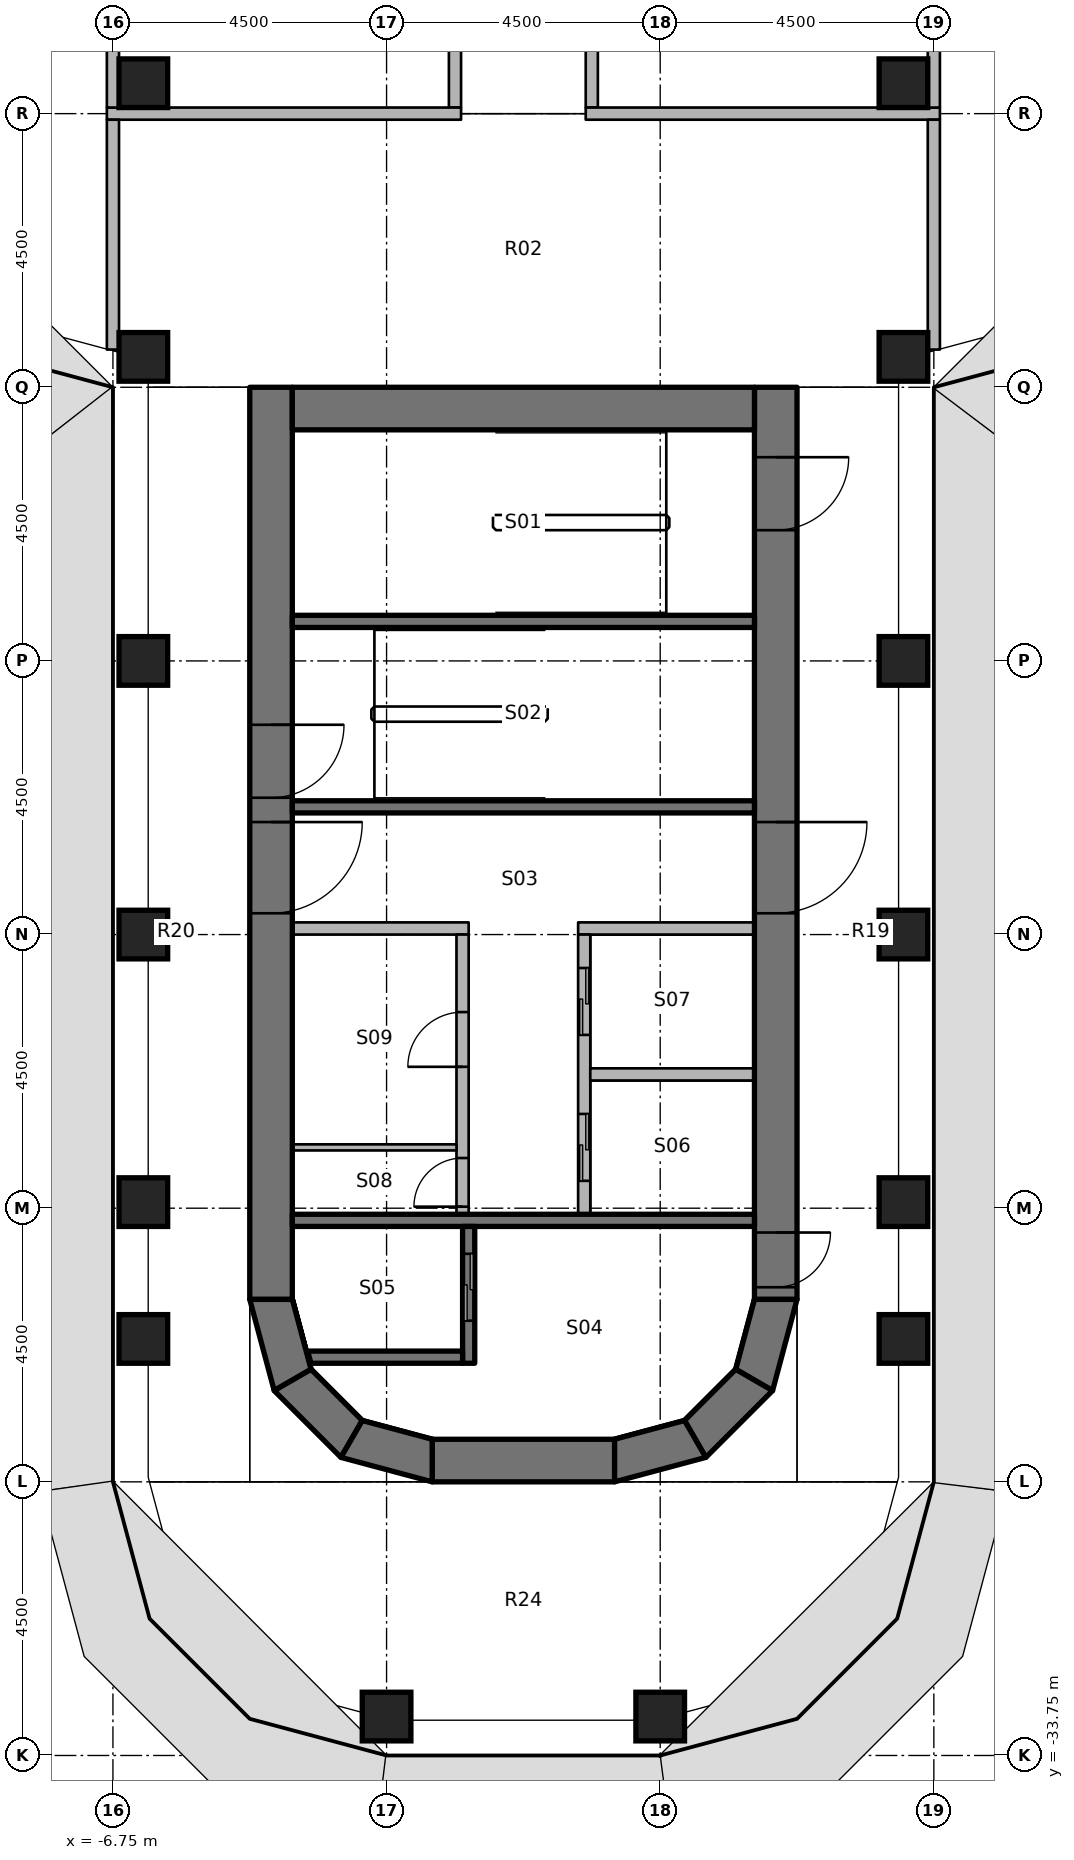
"""IFC4 building model, lengths in metres.
Left out: names, types, materials, properties, quantities, classifications, styles, units other than length and angle.
Written with IfcOpenShell. Run it as: python <this file> out.ifc"""

import sys

from ifc_helpers import new_model, si_unit, direction, frame, frame_2d, origin, origin_2d, place, context, subcontext, project, spatial, polyline, rectangle, outline, extrude, element, fill, save


model = new_model("IFC4")
c1 = context("Model", 3, precision=1e-05, world=origin(), true_north=direction((0.0, 1.0)))
c2 = subcontext(c1, "Body", "Model", "MODEL_VIEW")
j1 = project(units=[si_unit("LENGTHUNIT", "METRE"), si_unit("PLANEANGLEUNIT", "RADIAN")], contexts=[c1])
p1 = place(None, origin())
s1 = spatial("IfcSite", under=j1, at=p1, CompositionType="ELEMENT")
p2 = place(p1, origin())
s2 = spatial("IfcBuilding", under=s1, at=p2, CompositionType="ELEMENT")
p3 = place(p2, frame((0.0, 0.0, 144.8)))
s3 = spatial("IfcBuildingStorey", under=s2, at=p3, CompositionType="ELEMENT", Elevation=144.8)
for number, where, z_axis, x_axis in (
    (1, (-6.25, -26.9, 0.0), (0.0, 0.0, 1.0), (1.0, 0.0, 0.0)),
    (2, (-6.25, -24.65, 0.0), (0.0, 0.0, 1.0), (1.0, 0.0, 0.0)),
    (3, (-6.25, -20.25, 0.0), (0.0, 0.0, 1.0), (1.0, 0.0, 0.0)),
    (4, (-6.25, -15.75, 0.0), (0.0, 0.0, 1.0), (1.0, 0.0, 0.0)),
    (5, (-6.25, -10.75, 0.0), (0.0, 0.0, 1.0), (1.0, 0.0, 0.0)),
    (6, (-6.25, -6.25, 0.0), (0.0, 0.0, 1.0), (1.0, 0.0, 0.0)),
    (7, (-2.25, -33.11, 0.0), (0.0, 0.0, 1.0), (1.0, 0.0, 0.0)),
    (8, (2.25, -33.11, 0.0), (0.0, 0.0, 1.0), (1.0, 0.0, 0.0)),
    (9, (6.25, -26.9, 0.0), (0.0, 0.0, 1.0), (1.0, 0.0, 0.0)),
    (10, (6.25, -24.65, 0.0), (0.0, 0.0, 1.0), (1.0, 0.0, 0.0)),
    (11, (6.25, -20.25, 0.0), (0.0, 0.0, 1.0), (1.0, 0.0, 0.0)),
    (12, (6.25, -15.75, 0.0), (0.0, 0.0, 1.0), (1.0, 0.0, 0.0)),
    (13, (6.25, -10.75, 0.0), (0.0, 0.0, 1.0), (1.0, 0.0, 0.0)),
    (14, (6.25, -6.25, 0.0), (0.0, 0.0, 1.0), (1.0, 0.0, 0.0)),
):
    element("IfcColumn", number, at=place(p3, frame(where, z_axis=z_axis, x_axis=x_axis)), inside=s3, PredefinedType="COLUMN", context=c2, shape_type="SweptSolid", body=[
        extrude(rectangle(XDim=0.8, YDim=0.8, at=origin_2d()), origin(), (0.0, 0.0, 1.0), 3.65),
    ])
p4 = place(p3, frame((-4.15, -11.25, 0.0), z_axis=(0.0, 0.0, 1.0), x_axis=(0.0, -1.0, 0.0)))
e15 = element("IfcWall", 15, at=p4, inside=s3, PredefinedType="SHEAR", context=c2, shape_type="SweptSolid", body=[
    extrude(rectangle(XDim=15.0, YDim=0.7, at=frame_2d((7.5, 0.0))), origin(), (0.0, 0.0, 1.0), 3.8),
])
p5 = place(p4, frame((7.15, 0.0, 0.0)))
e16 = element("IfcOpeningElement", 16, at=p5, cuts=e15, PredefinedType="OPENING", context=c2, shape_type="SweptSolid", body=[
    extrude(rectangle(XDim=1.5, YDim=2.3, at=frame_2d((0.75, 1.15))), frame((0.0, 0.36, 0.0), z_axis=(0.0, -1.0, 0.0), x_axis=(1.0, 0.0, 0.0)), (0.0, 0.0, 1.0), 0.72),
])
p6 = place(p4, frame((5.55, 0.0, 0.0)))
e17 = element("IfcOpeningElement", 17, at=p6, cuts=e15, PredefinedType="OPENING", context=c2, shape_type="SweptSolid", body=[
    extrude(rectangle(XDim=1.2, YDim=2.1, at=frame_2d((0.6, 1.05))), frame((0.0, 0.36, 0.0), z_axis=(0.0, -1.0, 0.0), x_axis=(1.0, 0.0, 0.0)), (0.0, 0.0, 1.0), 0.72),
])
p7 = place(p3, frame((4.15, -11.25, 0.0), z_axis=(0.0, 0.0, 1.0), x_axis=(0.0, -1.0, 0.0)))
e18 = element("IfcWall", 18, at=p7, inside=s3, PredefinedType="SHEAR", context=c2, shape_type="SweptSolid", body=[
    extrude(rectangle(XDim=15.0, YDim=0.7, at=frame_2d((7.5, 0.0))), origin(), (0.0, 0.0, 1.0), 3.8),
])
p8 = place(p7, frame((7.15, 0.0, 0.0)))
e19 = element("IfcOpeningElement", 19, at=p8, cuts=e18, PredefinedType="OPENING", context=c2, shape_type="SweptSolid", body=[
    extrude(rectangle(XDim=1.5, YDim=2.3, at=frame_2d((0.75, 1.15))), frame((0.0, 0.36, 0.0), z_axis=(0.0, -1.0, 0.0), x_axis=(1.0, 0.0, 0.0)), (0.0, 0.0, 1.0), 0.72),
])
p9 = place(p7, frame((13.9, 0.0, 0.0)))
e20 = element("IfcOpeningElement", 20, at=p9, cuts=e18, PredefinedType="OPENING", context=c2, shape_type="SweptSolid", body=[
    extrude(rectangle(XDim=0.9, YDim=2.1, at=frame_2d((0.45, 1.05))), frame((0.0, 0.36, 0.0), z_axis=(0.0, -1.0, 0.0), x_axis=(1.0, 0.0, 0.0)), (0.0, 0.0, 1.0), 0.72),
])
p10 = place(p7, frame((1.15, 0.0, 0.0)))
e21 = element("IfcOpeningElement", 21, at=p10, cuts=e18, PredefinedType="OPENING", context=c2, shape_type="SweptSolid", body=[
    extrude(rectangle(XDim=1.2, YDim=2.1, at=frame_2d((0.6, 1.05))), frame((0.0, 0.36, 0.0), z_axis=(0.0, -1.0, 0.0), x_axis=(1.0, 0.0, 0.0)), (0.0, 0.0, 1.0), 0.72),
])
p11 = place(p3, frame((-3.8, -11.6, 0.0), z_axis=(0.0, 0.0, 1.0), x_axis=(1.0, 0.0, 0.0)))
e22 = element("IfcWall", 22, at=p11, inside=s3, PredefinedType="SHEAR", context=c2, shape_type="SweptSolid", body=[
    extrude(rectangle(XDim=7.6, YDim=0.7, at=frame_2d((3.8, 0.0))), origin(), (0.0, 0.0, 1.0), 3.8),
])
p12 = place(p3, frame((-1.5, -28.9, 0.0), z_axis=(0.0, 0.0, 1.0), x_axis=(1.0, 0.0, 0.0)))
e23 = element("IfcWall", 23, at=p12, inside=s3, PredefinedType="SHEAR", context=c2, shape_type="SweptSolid", body=[
    extrude(rectangle(XDim=3.0, YDim=0.7, at=frame_2d((1.5, 0.0))), origin(), (0.0, 0.0, 1.0), 3.8),
])
p13 = place(p3, origin())
e24 = element("IfcWall", 24, at=p13, inside=s3, PredefinedType="SHEAR", context=c2, shape_type="SweptSolid", body=[
    extrude(outline(polyline([(-4.5, -26.25), (-4.098, -27.75), (-3.492, -27.4), (-3.8, -26.25), (-4.5, -26.25)])), origin(), (0.0, 0.0, 1.0), 3.8),
])
p14 = place(p3, origin())
e25 = element("IfcWall", 25, at=p14, inside=s3, PredefinedType="SHEAR", context=c2, shape_type="SweptSolid", body=[
    extrude(outline(polyline([(-4.098, -27.75), (-3.0, -28.848), (-2.65, -28.242), (-3.492, -27.4), (-4.098, -27.75)])), origin(), (0.0, 0.0, 1.0), 3.8),
])
p15 = place(p3, origin())
e26 = element("IfcWall", 26, at=p15, inside=s3, PredefinedType="SHEAR", context=c2, shape_type="SweptSolid", body=[
    extrude(outline(polyline([(-3.0, -28.848), (-1.5, -29.25), (-1.5, -28.55), (-2.65, -28.242), (-3.0, -28.848)])), origin(), (0.0, 0.0, 1.0), 3.8),
])
p16 = place(p3, origin())
e27 = element("IfcWall", 27, at=p16, inside=s3, PredefinedType="SHEAR", context=c2, shape_type="SweptSolid", body=[
    extrude(outline(polyline([(4.5, -26.25), (4.098, -27.75), (3.492, -27.4), (3.8, -26.25), (4.5, -26.25)])), origin(), (0.0, 0.0, 1.0), 3.8),
])
p17 = place(p3, origin())
e28 = element("IfcWall", 28, at=p17, inside=s3, PredefinedType="SHEAR", context=c2, shape_type="SweptSolid", body=[
    extrude(outline(polyline([(4.098, -27.75), (3.0, -28.848), (2.65, -28.242), (3.492, -27.4), (4.098, -27.75)])), origin(), (0.0, 0.0, 1.0), 3.8),
])
p18 = place(p3, origin())
e29 = element("IfcWall", 29, at=p18, inside=s3, PredefinedType="SHEAR", context=c2, shape_type="SweptSolid", body=[
    extrude(outline(polyline([(3.0, -28.848), (1.5, -29.25), (1.5, -28.55), (2.65, -28.242), (3.0, -28.848)])), origin(), (0.0, 0.0, 1.0), 3.8),
])
p19 = place(p3, frame((3.8, -24.95, 0.0), z_axis=(0.0, 0.0, 1.0), x_axis=(-1.0, 0.0, 0.0)))
e30 = element("IfcWall", 30, at=p19, inside=s3, PredefinedType="SHEAR", context=c2, shape_type="SweptSolid", body=[
    extrude(rectangle(XDim=7.6, YDim=0.2, at=frame_2d((3.8, 0.0))), origin(), (0.0, 0.0, 1.0), 3.65),
])
p20 = place(p3, frame((-0.9, -27.3, 0.0), z_axis=(0.0, 0.0, 1.0), x_axis=(0.0, 1.0, 0.0)))
e31 = element("IfcWall", 31, at=p20, inside=s3, PredefinedType="SHEAR", context=c2, shape_type="SweptSolid", body=[
    extrude(rectangle(XDim=2.25, YDim=0.2, at=frame_2d((1.125, 0.0))), origin(), (0.0, 0.0, 1.0), 3.65),
])
p21 = place(p20, frame((0.7, 0.0, 0.0)))
e32 = element("IfcOpeningElement", 32, at=p21, cuts=e31, PredefinedType="OPENING", context=c2, shape_type="SweptSolid", body=[
    extrude(rectangle(XDim=1.1, YDim=2.3, at=frame_2d((0.55, 1.15))), frame((0.0, 0.11, 0.0), z_axis=(0.0, -1.0, 0.0), x_axis=(1.0, 0.0, 0.0)), (0.0, 0.0, 1.0), 0.22),
])
p22 = place(p3, origin())
e33 = element("IfcWall", 33, at=p22, inside=s3, PredefinedType="SHEAR", context=c2, shape_type="SweptSolid", body=[
    extrude(outline(polyline([(-1.0, -27.1), (-3.548, -27.1), (-3.494, -27.3), (-1.0, -27.3), (-1.0, -27.1)])), origin(), (0.0, 0.0, 1.0), 3.65),
])
for number, where, z_axis, x_axis in (
    (34, (3.8, -18.15, 0.0), (0.0, 0.0, 1.0), (-1.0, 0.0, 0.0)),
    (35, (3.8, -15.1, 0.0), (0.0, 0.0, 1.0), (-1.0, 0.0, 0.0)),
):
    element("IfcWall", number, at=place(p3, frame(where, z_axis=z_axis, x_axis=x_axis)), inside=s3, PredefinedType="SHEAR", context=c2, shape_type="SweptSolid", body=[
        extrude(rectangle(XDim=7.6, YDim=0.2, at=frame_2d((3.8, 0.0))), origin(), (0.0, 0.0, 1.0), 3.65),
    ])
p23 = place(p3, frame((3.8, -20.15, 0.0), z_axis=(0.0, 0.0, 1.0), x_axis=(-1.0, 0.0, 0.0)))
e36 = element("IfcWall", 36, at=p23, inside=s3, PredefinedType="PARTITIONING", context=c2, shape_type="SweptSolid", body=[
    extrude(rectangle(XDim=2.9, YDim=0.2, at=frame_2d((1.45, 0.0))), origin(), (0.0, 0.0, 1.0), 3.65),
])
p24 = place(p3, frame((1.0, -24.85, 0.0), z_axis=(0.0, 0.0, 1.0), x_axis=(0.0, 1.0, 0.0)))
e37 = element("IfcWall", 37, at=p24, inside=s3, PredefinedType="PARTITIONING", context=c2, shape_type="SweptSolid", body=[
    extrude(rectangle(XDim=4.6, YDim=0.2, at=frame_2d((2.3, 0.0))), origin(), (0.0, 0.0, 1.0), 3.65),
])
p25 = place(p24, frame((0.55, 0.0, 0.0)))
e38 = element("IfcOpeningElement", 38, at=p25, cuts=e37, PredefinedType="OPENING", context=c2, shape_type="SweptSolid", body=[
    extrude(rectangle(XDim=1.1, YDim=2.3, at=frame_2d((0.55, 1.15))), frame((0.0, 0.11, 0.0), z_axis=(0.0, -1.0, 0.0), x_axis=(1.0, 0.0, 0.0)), (0.0, 0.0, 1.0), 0.22),
])
p26 = place(p24, frame((2.95, 0.0, 0.0)))
e39 = element("IfcOpeningElement", 39, at=p26, cuts=e37, PredefinedType="OPENING", context=c2, shape_type="SweptSolid", body=[
    extrude(rectangle(XDim=1.1, YDim=2.3, at=frame_2d((0.55, 1.15))), frame((0.0, 0.11, 0.0), z_axis=(0.0, -1.0, 0.0), x_axis=(1.0, 0.0, 0.0)), (0.0, 0.0, 1.0), 0.22),
])
p27 = place(p3, frame((-0.9, -20.15, 0.0), z_axis=(0.0, 0.0, 1.0), x_axis=(-1.0, 0.0, 0.0)))
e40 = element("IfcWall", 40, at=p27, inside=s3, PredefinedType="PARTITIONING", context=c2, shape_type="SweptSolid", body=[
    extrude(rectangle(XDim=2.9, YDim=0.2, at=frame_2d((1.45, 0.0))), origin(), (0.0, 0.0, 1.0), 3.65),
])
p28 = place(p3, frame((-1.0, -24.85, 0.0), z_axis=(0.0, 0.0, 1.0), x_axis=(0.0, 1.0, 0.0)))
e41 = element("IfcWall", 41, at=p28, inside=s3, PredefinedType="PARTITIONING", context=c2, shape_type="SweptSolid", body=[
    extrude(rectangle(XDim=4.6, YDim=0.2, at=frame_2d((2.3, 0.0))), origin(), (0.0, 0.0, 1.0), 3.65),
])
p29 = place(p28, frame((0.125, 0.0, 0.0)))
e42 = element("IfcOpeningElement", 42, at=p29, cuts=e41, PredefinedType="OPENING", context=c2, shape_type="SweptSolid", body=[
    extrude(rectangle(XDim=0.8, YDim=2.1, at=frame_2d((0.4, 1.05))), frame((0.0, 0.11, 0.0), z_axis=(0.0, -1.0, 0.0), x_axis=(1.0, 0.0, 0.0)), (0.0, 0.0, 1.0), 0.22),
])
p30 = place(p28, frame((2.425, 0.0, 0.0)))
e43 = element("IfcOpeningElement", 43, at=p30, cuts=e41, PredefinedType="OPENING", context=c2, shape_type="SweptSolid", body=[
    extrude(rectangle(XDim=0.9, YDim=2.1, at=frame_2d((0.45, 1.05))), frame((0.0, 0.11, 0.0), z_axis=(0.0, -1.0, 0.0), x_axis=(1.0, 0.0, 0.0)), (0.0, 0.0, 1.0), 0.22),
])
p31 = place(p3, frame((3.8, -22.55, 0.0), z_axis=(0.0, 0.0, 1.0), x_axis=(-1.0, 0.0, 0.0)))
e44 = element("IfcWall", 44, at=p31, inside=s3, PredefinedType="PARTITIONING", context=c2, shape_type="SweptSolid", body=[
    extrude(rectangle(XDim=2.7, YDim=0.2, at=frame_2d((1.35, 0.0))), origin(), (0.0, 0.0, 1.0), 3.65),
])
p32 = place(p3, frame((-1.1, -23.75, 0.0), z_axis=(0.0, 0.0, 1.0), x_axis=(-1.0, 0.0, 0.0)))
e45 = element("IfcWall", 45, at=p32, inside=s3, PredefinedType="PARTITIONING", context=c2, shape_type="SweptSolid", body=[
    extrude(rectangle(XDim=2.7, YDim=0.1, at=frame_2d((1.35, 0.0))), origin(), (0.0, 0.0, 1.0), 3.65),
])
p33 = place(p3, frame((1.125, -3.6, 0.0), z_axis=(0.0, 0.0, 1.0), x_axis=(0.0, -1.0, 0.0)))
e46 = element("IfcWall", 46, at=p33, inside=s3, PredefinedType="PARTITIONING", context=c2, shape_type="SweptSolid", body=[
    extrude(rectangle(XDim=3.05, YDim=0.2, at=frame_2d((1.525, 0.0))), origin(), (0.0, 0.0, 1.0), 2.75),
])
p34 = place(p33, frame((1.075, 0.0, 0.0)))
e47 = element("IfcOpeningElement", 47, at=p34, cuts=e46, PredefinedType="OPENING", context=c2, shape_type="SweptSolid", body=[
    extrude(rectangle(XDim=0.9, YDim=2.1, at=frame_2d((0.45, 1.05))), frame((0.0, 0.11, 0.0), z_axis=(0.0, -1.0, 0.0), x_axis=(1.0, 0.0, 0.0)), (0.0, 0.0, 1.0), 0.22),
])
p35 = place(p3, frame((-1.125, -6.65, 0.0), z_axis=(0.0, 0.0, 1.0), x_axis=(0.0, 1.0, 0.0)))
e48 = element("IfcWall", 48, at=p35, inside=s3, PredefinedType="PARTITIONING", context=c2, shape_type="SweptSolid", body=[
    extrude(rectangle(XDim=6.55, YDim=0.2, at=frame_2d((3.275, 0.0))), origin(), (0.0, 0.0, 1.0), 2.75),
])
p36 = place(p3, frame((1.025, -6.75, 0.0), z_axis=(0.0, 0.0, 1.0), x_axis=(1.0, 0.0, 0.0)))
e49 = element("IfcWall", 49, at=p36, inside=s3, PredefinedType="PARTITIONING", context=c2, shape_type="SweptSolid", body=[
    extrude(rectangle(XDim=5.825, YDim=0.2, at=frame_2d((2.913, 0.0))), origin(), (0.0, 0.0, 1.0), 2.75),
])
p37 = place(p3, frame((6.75, -10.63, 0.0), z_axis=(0.0, 0.0, 1.0), x_axis=(0.0, 1.0, 0.0)))
e50 = element("IfcWall", 50, at=p37, inside=s3, PredefinedType="PARTITIONING", context=c2, shape_type="SweptSolid", body=[
    extrude(rectangle(XDim=3.78, YDim=0.2, at=frame_2d((1.89, 0.0))), origin(), (0.0, 0.0, 1.0), 2.75),
])
p38 = place(p3, frame((-6.85, -6.75, 0.0), z_axis=(0.0, 0.0, 1.0), x_axis=(1.0, 0.0, 0.0)))
e51 = element("IfcWall", 51, at=p38, inside=s3, PredefinedType="PARTITIONING", context=c2, shape_type="SweptSolid", body=[
    extrude(rectangle(XDim=5.825, YDim=0.2, at=frame_2d((2.913, 0.0))), origin(), (0.0, 0.0, 1.0), 2.75),
])
p39 = place(p3, frame((-6.75, -10.63, 0.0), z_axis=(0.0, 0.0, 1.0), x_axis=(0.0, 1.0, 0.0)))
e52 = element("IfcWall", 52, at=p39, inside=s3, PredefinedType="PARTITIONING", context=c2, shape_type="SweptSolid", body=[
    extrude(rectangle(XDim=3.78, YDim=0.2, at=frame_2d((1.89, 0.0))), origin(), (0.0, 0.0, 1.0), 2.75),
])
p40 = place(p3, frame((6.75, -6.65, 0.0), z_axis=(0.0, 0.0, 1.0), x_axis=(0.0, 1.0, 0.0)))
e53 = element("IfcWall", 53, at=p40, inside=s3, PredefinedType="PARTITIONING", context=c2, shape_type="SweptSolid", body=[
    extrude(rectangle(XDim=3.05, YDim=0.2, at=frame_2d((1.525, 0.0))), origin(), (0.0, 0.0, 1.0), 2.75),
])
p41 = place(p3, frame((-6.75, -6.65, 0.0), z_axis=(0.0, 0.0, 1.0), x_axis=(0.0, 1.0, 0.0)))
e54 = element("IfcWall", 54, at=p41, inside=s3, PredefinedType="PARTITIONING", context=c2, shape_type="SweptSolid", body=[
    extrude(rectangle(XDim=6.55, YDim=0.2, at=frame_2d((3.275, 0.0))), origin(), (0.0, 0.0, 1.0), 2.75),
])
p42 = place(p8, origin())
e55 = element("IfcDoor", 55, at=p42, inside=s3, OperationType="DOUBLE_DOOR_SINGLE_SWING", PredefinedType="DOOR", context=c2, shape_type="SweptSolid", body=[
    extrude(rectangle(XDim=1.5, YDim=2.3, at=frame_2d((0.75, 1.15))), frame((0.0, 0.025, 0.0), z_axis=(0.0, -1.0, 0.0), x_axis=(1.0, 0.0, 0.0)), (0.0, 0.0, 1.0), 0.05),
])
fill(e19, e55)
p43 = place(p5, origin())
e56 = element("IfcDoor", 56, at=p43, inside=s3, OperationType="DOUBLE_DOOR_SINGLE_SWING", PredefinedType="DOOR", context=c2, shape_type="SweptSolid", body=[
    extrude(rectangle(XDim=1.5, YDim=2.3, at=frame_2d((0.75, 1.15))), frame((0.0, 0.025, 0.0), z_axis=(0.0, -1.0, 0.0), x_axis=(1.0, 0.0, 0.0)), (0.0, 0.0, 1.0), 0.05),
])
fill(e16, e56)
p44 = place(p9, origin())
e57 = element("IfcDoor", 57, at=p44, inside=s3, OperationType="SINGLE_SWING_LEFT", PredefinedType="DOOR", context=c2, shape_type="SweptSolid", body=[
    extrude(rectangle(XDim=0.9, YDim=2.1, at=frame_2d((0.45, 1.05))), frame((0.0, 0.025, 0.0), z_axis=(0.0, -1.0, 0.0), x_axis=(1.0, 0.0, 0.0)), (0.0, 0.0, 1.0), 0.05),
])
fill(e20, e57)
p45 = place(p6, origin())
e58 = element("IfcDoor", 58, at=p45, inside=s3, OperationType="SINGLE_SWING_LEFT", PredefinedType="DOOR", context=c2, shape_type="SweptSolid", body=[
    extrude(rectangle(XDim=1.2, YDim=2.1, at=frame_2d((0.6, 1.05))), frame((0.0, 0.025, 0.0), z_axis=(0.0, -1.0, 0.0), x_axis=(1.0, 0.0, 0.0)), (0.0, 0.0, 1.0), 0.05),
])
fill(e17, e58)
p46 = place(p10, origin())
e59 = element("IfcDoor", 59, at=p46, inside=s3, OperationType="SINGLE_SWING_RIGHT", PredefinedType="DOOR", context=c2, shape_type="SweptSolid", body=[
    extrude(rectangle(XDim=1.2, YDim=2.1, at=frame_2d((0.6, 1.05))), frame((0.0, 0.025, 0.0), z_axis=(0.0, -1.0, 0.0), x_axis=(1.0, 0.0, 0.0)), (0.0, 0.0, 1.0), 0.05),
])
fill(e21, e59)
p47 = place(p21, origin())
e60 = element("IfcDoor", 60, at=p47, inside=s3, OperationType="DOUBLE_DOOR_SLIDING", PredefinedType="DOOR", context=c2, shape_type="SweptSolid", body=[
    extrude(rectangle(XDim=1.1, YDim=2.3, at=frame_2d((0.55, 1.15))), frame((0.0, 0.025, 0.0), z_axis=(0.0, -1.0, 0.0), x_axis=(1.0, 0.0, 0.0)), (0.0, 0.0, 1.0), 0.05),
])
fill(e32, e60)
p48 = place(p25, origin())
e61 = element("IfcDoor", 61, at=p48, inside=s3, OperationType="DOUBLE_DOOR_SLIDING", PredefinedType="DOOR", context=c2, shape_type="SweptSolid", body=[
    extrude(rectangle(XDim=1.1, YDim=2.3, at=frame_2d((0.55, 1.15))), frame((0.0, 0.025, 0.0), z_axis=(0.0, -1.0, 0.0), x_axis=(1.0, 0.0, 0.0)), (0.0, 0.0, 1.0), 0.05),
])
fill(e38, e61)
p49 = place(p26, origin())
e62 = element("IfcDoor", 62, at=p49, inside=s3, OperationType="DOUBLE_DOOR_SLIDING", PredefinedType="DOOR", context=c2, shape_type="SweptSolid", body=[
    extrude(rectangle(XDim=1.1, YDim=2.3, at=frame_2d((0.55, 1.15))), frame((0.0, 0.025, 0.0), z_axis=(0.0, -1.0, 0.0), x_axis=(1.0, 0.0, 0.0)), (0.0, 0.0, 1.0), 0.05),
])
fill(e39, e62)
p50 = place(p29, origin())
e63 = element("IfcDoor", 63, at=p50, inside=s3, OperationType="SINGLE_SWING_LEFT", PredefinedType="DOOR", context=c2, shape_type="SweptSolid", body=[
    extrude(rectangle(XDim=0.8, YDim=2.1, at=frame_2d((0.4, 1.05))), frame((0.0, 0.025, 0.0), z_axis=(0.0, -1.0, 0.0), x_axis=(1.0, 0.0, 0.0)), (0.0, 0.0, 1.0), 0.05),
])
fill(e42, e63)
p51 = place(p30, origin())
e64 = element("IfcDoor", 64, at=p51, inside=s3, OperationType="SINGLE_SWING_RIGHT", PredefinedType="DOOR", context=c2, shape_type="SweptSolid", body=[
    extrude(rectangle(XDim=0.9, YDim=2.1, at=frame_2d((0.45, 1.05))), frame((0.0, 0.025, 0.0), z_axis=(0.0, -1.0, 0.0), x_axis=(1.0, 0.0, 0.0)), (0.0, 0.0, 1.0), 0.05),
])
fill(e43, e64)
save(model, sys.argv[1])
